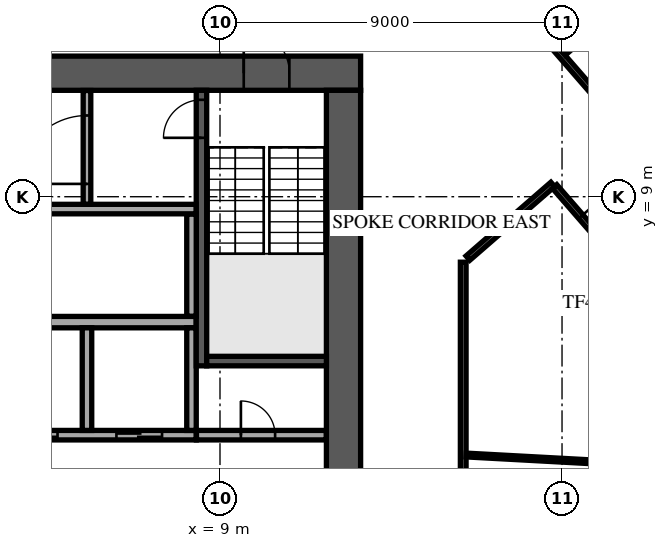
"""IFC4 building model, lengths in metres.
Left out: names, types, materials, properties, quantities, classifications, styles, units other than length and angle.
Written with IfcOpenShell. Run it as: python <this file> out.ifc"""

import sys

from ifc_helpers import new_model, si_unit, direction, frame, frame_2d, origin, place, context, subcontext, project, spatial, rectangle, extrude, element, fill, save


model = new_model("IFC4")
c1 = context("Model", 3, precision=1e-05, world=origin(), true_north=direction((0.0, 1.0)))
c2 = subcontext(c1, "Body", "Model", "MODEL_VIEW")
j1 = project(units=[si_unit("LENGTHUNIT", "METRE"), si_unit("PLANEANGLEUNIT", "RADIAN")], contexts=[c1])
p1 = place(None, origin())
s1 = spatial("IfcSite", under=j1, at=p1, CompositionType="ELEMENT")
p2 = place(p1, origin())
s2 = spatial("IfcBuilding", under=s1, at=p2, CompositionType="ELEMENT")
p3 = place(p2, frame((0.0, 0.0, 193.3)))
s3 = spatial("IfcBuildingStorey", under=s2, at=p3, CompositionType="ELEMENT", Elevation=193.3)
p4 = place(p3, frame((-12.7, 12.25, 0.0), z_axis=(0.0, 0.0, 1.0), x_axis=(1.0, 0.0, 0.0)))
e1 = element("IfcWall", 1, at=p4, inside=s3, PredefinedType="SHEAR", context=c2, shape_type="SweptSolid", body=[
    extrude(rectangle(XDim=25.4, YDim=0.9, at=frame_2d((12.7, 0.0))), origin(), (0.0, 0.0, 1.0), 3.62),
])
p5 = place(p4, frame((11.5, 0.0, 0.0)))
e2 = element("IfcOpeningElement", 2, at=p5, cuts=e1, PredefinedType="OPENING", context=c2, shape_type="SweptSolid", body=[
    extrude(rectangle(XDim=2.4, YDim=2.4, at=frame_2d((1.2, 1.2))), frame((0.0, 0.46, 0.0), z_axis=(0.0, -1.0, 0.0), x_axis=(1.0, 0.0, 0.0)), (0.0, 0.0, 1.0), 0.92),
])
p6 = place(p4, frame((22.325, 0.0, 0.0)))
e3 = element("IfcOpeningElement", 3, at=p6, cuts=e1, PredefinedType="OPENING", context=c2, shape_type="SweptSolid", body=[
    extrude(rectangle(XDim=1.2, YDim=2.1, at=frame_2d((0.6, 1.05))), frame((0.0, 0.46, 0.0), z_axis=(0.0, -1.0, 0.0), x_axis=(1.0, 0.0, 0.0)), (0.0, 0.0, 1.0), 0.92),
])
p7 = place(p4, frame((1.3, 0.0, 0.0)))
e4 = element("IfcOpeningElement", 4, at=p7, cuts=e1, PredefinedType="OPENING", context=c2, shape_type="SweptSolid", body=[
    extrude(rectangle(XDim=1.0, YDim=2.1, at=frame_2d((0.5, 1.05))), frame((0.0, 0.46, 0.0), z_axis=(0.0, -1.0, 0.0), x_axis=(1.0, 0.0, 0.0)), (0.0, 0.0, 1.0), 0.92),
])
p8 = place(p3, frame((12.25, -11.8, 0.0), z_axis=(0.0, 0.0, 1.0), x_axis=(0.0, 1.0, 0.0)))
e5 = element("IfcWall", 5, at=p8, inside=s3, PredefinedType="SHEAR", context=c2, shape_type="SweptSolid", body=[
    extrude(rectangle(XDim=23.6, YDim=0.9, at=frame_2d((11.8, 0.0))), origin(), (0.0, 0.0, 1.0), 3.62),
])
p9 = place(p8, frame((10.6, 0.0, 0.0)))
e6 = element("IfcOpeningElement", 6, at=p9, cuts=e5, PredefinedType="OPENING", context=c2, shape_type="SweptSolid", body=[
    extrude(rectangle(XDim=2.4, YDim=2.4, at=frame_2d((1.2, 1.2))), frame((0.0, 0.46, 0.0), z_axis=(0.0, -1.0, 0.0), x_axis=(1.0, 0.0, 0.0)), (0.0, 0.0, 1.0), 0.92),
])
p10 = place(p3, frame((-8.375, 5.7, 0.0), z_axis=(0.0, 0.0, 1.0), x_axis=(1.0, 0.0, 0.0)))
e7 = element("IfcWall", 7, at=p10, inside=s3, PredefinedType="SOLIDWALL", context=c2, shape_type="SweptSolid", body=[
    extrude(rectangle(XDim=16.75, YDim=0.3, at=frame_2d((8.375, 0.0))), origin(), (0.0, 0.0, 1.0), 3.62),
])
p11 = place(p3, frame((-8.375, 2.725, 0.0), z_axis=(0.0, 0.0, 1.0), x_axis=(1.0, 0.0, 0.0)))
e8 = element("IfcWall", 8, at=p11, inside=s3, PredefinedType="SOLIDWALL", context=c2, shape_type="SweptSolid", body=[
    extrude(rectangle(XDim=16.75, YDim=0.25, at=frame_2d((8.375, 0.0))), origin(), (0.0, 0.0, 1.0), 3.62),
])
p12 = place(p11, frame((0.9, 0.0, 0.0)))
e9 = element("IfcOpeningElement", 9, at=p12, cuts=e8, PredefinedType="OPENING", context=c2, shape_type="SweptSolid", body=[
    extrude(rectangle(XDim=1.2, YDim=2.1, at=frame_2d((0.6, 1.05))), frame((0.0, 0.135, 0.0), z_axis=(0.0, -1.0, 0.0), x_axis=(1.0, 0.0, 0.0)), (0.0, 0.0, 1.0), 0.27),
])
p13 = place(p11, frame((3.65, 0.0, 0.0)))
e10 = element("IfcOpeningElement", 10, at=p13, cuts=e8, PredefinedType="OPENING", context=c2, shape_type="SweptSolid", body=[
    extrude(rectangle(XDim=1.2, YDim=2.1, at=frame_2d((0.6, 1.05))), frame((0.0, 0.135, 0.0), z_axis=(0.0, -1.0, 0.0), x_axis=(1.0, 0.0, 0.0)), (0.0, 0.0, 1.0), 0.27),
])
p14 = place(p11, frame((6.4, 0.0, 0.0)))
e11 = element("IfcOpeningElement", 11, at=p14, cuts=e8, PredefinedType="OPENING", context=c2, shape_type="SweptSolid", body=[
    extrude(rectangle(XDim=1.2, YDim=2.1, at=frame_2d((0.6, 1.05))), frame((0.0, 0.135, 0.0), z_axis=(0.0, -1.0, 0.0), x_axis=(1.0, 0.0, 0.0)), (0.0, 0.0, 1.0), 0.27),
])
p15 = place(p11, frame((9.15, 0.0, 0.0)))
e12 = element("IfcOpeningElement", 12, at=p15, cuts=e8, PredefinedType="OPENING", context=c2, shape_type="SweptSolid", body=[
    extrude(rectangle(XDim=1.2, YDim=2.1, at=frame_2d((0.6, 1.05))), frame((0.0, 0.135, 0.0), z_axis=(0.0, -1.0, 0.0), x_axis=(1.0, 0.0, 0.0)), (0.0, 0.0, 1.0), 0.27),
])
p16 = place(p11, frame((11.9, 0.0, 0.0)))
e13 = element("IfcOpeningElement", 13, at=p16, cuts=e8, PredefinedType="OPENING", context=c2, shape_type="SweptSolid", body=[
    extrude(rectangle(XDim=1.2, YDim=2.1, at=frame_2d((0.6, 1.05))), frame((0.0, 0.135, 0.0), z_axis=(0.0, -1.0, 0.0), x_axis=(1.0, 0.0, 0.0)), (0.0, 0.0, 1.0), 0.27),
])
p17 = place(p11, frame((14.65, 0.0, 0.0)))
e14 = element("IfcOpeningElement", 14, at=p17, cuts=e8, PredefinedType="OPENING", context=c2, shape_type="SweptSolid", body=[
    extrude(rectangle(XDim=1.2, YDim=2.1, at=frame_2d((0.6, 1.05))), frame((0.0, 0.135, 0.0), z_axis=(0.0, -1.0, 0.0), x_axis=(1.0, 0.0, 0.0)), (0.0, 0.0, 1.0), 0.27),
])
for number, where, z_axis, x_axis in (
    (15, (5.5, 2.85, 0.0), (0.0, 0.0, 1.0), (0.0, 1.0, 0.0)),
    (16, (8.25, 2.85, 0.0), (0.0, 0.0, 1.0), (0.0, 1.0, 0.0)),
):
    element("IfcWall", number, at=place(p3, frame(where, z_axis=z_axis, x_axis=x_axis)), inside=s3, PredefinedType="SOLIDWALL", context=c2, shape_type="SweptSolid", body=[
        extrude(rectangle(XDim=2.7, YDim=0.25, at=frame_2d((1.35, 0.0))), origin(), (0.0, 0.0, 1.0), 3.62),
    ])
p18 = place(p3, frame((8.512, 4.55, 0.0), z_axis=(0.0, 0.0, 1.0), x_axis=(0.0, 1.0, 0.0)))
e17 = element("IfcWall", 17, at=p18, inside=s3, PredefinedType="SOLIDWALL", context=c2, shape_type="SweptSolid", body=[
    extrude(rectangle(XDim=7.25, YDim=0.275, at=frame_2d((3.625, 0.0))), origin(), (0.0, 0.0, 1.0), 3.62),
])
p19 = place(p18, frame((6.0, 0.0, 0.0)))
e18 = element("IfcOpeningElement", 18, at=p19, cuts=e17, PredefinedType="OPENING", context=c2, shape_type="SweptSolid", body=[
    extrude(rectangle(XDim=1.0, YDim=2.1, at=frame_2d((0.5, 1.05))), frame((0.0, 0.147, 0.0), z_axis=(0.0, -1.0, 0.0), x_axis=(1.0, 0.0, 0.0)), (0.0, 0.0, 1.0), 0.295),
])
p20 = place(p3, frame((8.65, 4.675, 0.0), z_axis=(0.0, 0.0, 1.0), x_axis=(1.0, 0.0, 0.0)))
e19 = element("IfcWall", 19, at=p20, inside=s3, PredefinedType="SOLIDWALL", context=c2, shape_type="SweptSolid", body=[
    extrude(rectangle(XDim=3.15, YDim=0.25, at=frame_2d((1.575, 0.0))), origin(), (0.0, 0.0, 1.0), 3.62),
])
p21 = place(p3, frame((8.38, 2.725, 0.0), z_axis=(0.0, 0.0, 1.0), x_axis=(1.0, 0.0, 0.0)))
e20 = element("IfcWall", 20, at=p21, inside=s3, PredefinedType="PARTITIONING", context=c2, shape_type="SweptSolid", body=[
    extrude(rectangle(XDim=3.415, YDim=0.25, at=frame_2d((1.708, 0.0))), origin(), (0.0, 0.0, 1.0), 3.62),
])
p22 = place(p21, frame((1.17, 0.0, 0.0)))
e21 = element("IfcOpeningElement", 21, at=p22, cuts=e20, PredefinedType="OPENING", context=c2, shape_type="SweptSolid", body=[
    extrude(rectangle(XDim=0.9, YDim=2.1, at=frame_2d((0.45, 1.05))), frame((0.0, 0.135, 0.0), z_axis=(0.0, -1.0, 0.0), x_axis=(1.0, 0.0, 0.0)), (0.0, 0.0, 1.0), 0.27),
])
p23 = place(p3, frame((8.25, 5.855, 0.0), z_axis=(0.0, 0.0, 1.0), x_axis=(0.0, 1.0, 0.0)))
e22 = element("IfcWall", 22, at=p23, inside=s3, PredefinedType="PARTITIONING", context=c2, shape_type="SweptSolid", body=[
    extrude(rectangle(XDim=2.69, YDim=0.25, at=frame_2d((1.345, 0.0))), origin(), (0.0, 0.0, 1.0), 3.62),
])
p24 = place(p3, frame((-8.35, 8.675, 0.0), z_axis=(0.0, 0.0, 1.0), x_axis=(1.0, 0.0, 0.0)))
e23 = element("IfcWall", 23, at=p24, inside=s3, PredefinedType="PARTITIONING", context=c2, shape_type="SweptSolid", body=[
    extrude(rectangle(XDim=16.72, YDim=0.25, at=frame_2d((8.36, 0.0))), origin(), (0.0, 0.0, 1.0), 3.62),
])
p25 = place(p24, frame((0.975, 0.0, 0.0)))
e24 = element("IfcOpeningElement", 24, at=p25, cuts=e23, PredefinedType="OPENING", context=c2, shape_type="SweptSolid", body=[
    extrude(rectangle(XDim=1.0, YDim=2.1, at=frame_2d((0.5, 1.05))), frame((0.0, 0.135, 0.0), z_axis=(0.0, -1.0, 0.0), x_axis=(1.0, 0.0, 0.0)), (0.0, 0.0, 1.0), 0.27),
])
p26 = place(p24, frame((6.375, 0.0, 0.0)))
e25 = element("IfcOpeningElement", 25, at=p26, cuts=e23, PredefinedType="OPENING", context=c2, shape_type="SweptSolid", body=[
    extrude(rectangle(XDim=1.2, YDim=2.1, at=frame_2d((0.6, 1.05))), frame((0.0, 0.135, 0.0), z_axis=(0.0, -1.0, 0.0), x_axis=(1.0, 0.0, 0.0)), (0.0, 0.0, 1.0), 0.27),
])
p27 = place(p3, frame((5.5, 8.805, 0.0), z_axis=(0.0, 0.0, 1.0), x_axis=(0.0, 1.0, 0.0)))
e26 = element("IfcWall", 26, at=p27, inside=s3, PredefinedType="PARTITIONING", context=c2, shape_type="SweptSolid", body=[
    extrude(rectangle(XDim=2.99, YDim=0.2, at=frame_2d((1.495, 0.0))), origin(), (0.0, 0.0, 1.0), 3.62),
])
p28 = place(p27, frame((0.532, 0.0, 0.0)))
e27 = element("IfcOpeningElement", 27, at=p28, cuts=e26, PredefinedType="OPENING", context=c2, shape_type="SweptSolid", body=[
    extrude(rectangle(XDim=1.8, YDim=2.1, at=frame_2d((0.9, 1.05))), frame((0.0, 0.11, 0.0), z_axis=(0.0, -1.0, 0.0), x_axis=(1.0, 0.0, 0.0)), (0.0, 0.0, 1.0), 0.22),
])
p29 = place(p3, frame((35.208, 4.768, 0.0), z_axis=(0.0, 0.0, 1.0), x_axis=(-0.656058749455, 0.754709823219, 0.0)))
e28 = element("IfcWall", 28, at=p29, inside=s3, PredefinedType="STANDARD", context=c2, shape_type="SweptSolid", body=[
    extrude(rectangle(XDim=39.0, YDim=0.6, at=frame_2d((19.5, 0.0))), origin(), (0.0, 0.0, 1.0), 3.62),
])
p30 = place(p29, frame((1.217, 0.0, 0.9)))
e29 = element("IfcOpeningElement", 29, at=p30, cuts=e28, PredefinedType="OPENING", context=c2, shape_type="SweptSolid", body=[
    extrude(rectangle(XDim=1.9, YDim=2.1, at=frame_2d((0.95, 1.05))), frame((0.0, 0.31, 0.0), z_axis=(0.0, -1.0, 0.0), x_axis=(1.0, 0.0, 0.0)), (0.0, 0.0, 1.0), 0.62),
])
p31 = place(p29, frame((5.55, 0.0, 0.9)))
e30 = element("IfcOpeningElement", 30, at=p31, cuts=e28, PredefinedType="OPENING", context=c2, shape_type="SweptSolid", body=[
    extrude(rectangle(XDim=1.9, YDim=2.1, at=frame_2d((0.95, 1.05))), frame((0.0, 0.31, 0.0), z_axis=(0.0, -1.0, 0.0), x_axis=(1.0, 0.0, 0.0)), (0.0, 0.0, 1.0), 0.62),
])
p32 = place(p29, frame((9.883, 0.0, 0.9)))
e31 = element("IfcOpeningElement", 31, at=p32, cuts=e28, PredefinedType="OPENING", context=c2, shape_type="SweptSolid", body=[
    extrude(rectangle(XDim=1.9, YDim=2.1, at=frame_2d((0.95, 1.05))), frame((0.0, 0.31, 0.0), z_axis=(0.0, -1.0, 0.0), x_axis=(1.0, 0.0, 0.0)), (0.0, 0.0, 1.0), 0.62),
])
p33 = place(p29, frame((14.217, 0.0, 0.9)))
e32 = element("IfcOpeningElement", 32, at=p33, cuts=e28, PredefinedType="OPENING", context=c2, shape_type="SweptSolid", body=[
    extrude(rectangle(XDim=1.9, YDim=2.1, at=frame_2d((0.95, 1.05))), frame((0.0, 0.31, 0.0), z_axis=(0.0, -1.0, 0.0), x_axis=(1.0, 0.0, 0.0)), (0.0, 0.0, 1.0), 0.62),
])
p34 = place(p29, frame((18.55, 0.0, 0.9)))
e33 = element("IfcOpeningElement", 33, at=p34, cuts=e28, PredefinedType="OPENING", context=c2, shape_type="SweptSolid", body=[
    extrude(rectangle(XDim=1.9, YDim=2.1, at=frame_2d((0.95, 1.05))), frame((0.0, 0.31, 0.0), z_axis=(0.0, -1.0, 0.0), x_axis=(1.0, 0.0, 0.0)), (0.0, 0.0, 1.0), 0.62),
])
p35 = place(p29, frame((22.883, 0.0, 0.9)))
e34 = element("IfcOpeningElement", 34, at=p35, cuts=e28, PredefinedType="OPENING", context=c2, shape_type="SweptSolid", body=[
    extrude(rectangle(XDim=1.9, YDim=2.1, at=frame_2d((0.95, 1.05))), frame((0.0, 0.31, 0.0), z_axis=(0.0, -1.0, 0.0), x_axis=(1.0, 0.0, 0.0)), (0.0, 0.0, 1.0), 0.62),
])
p36 = place(p29, frame((27.217, 0.0, 0.9)))
e35 = element("IfcOpeningElement", 35, at=p36, cuts=e28, PredefinedType="OPENING", context=c2, shape_type="SweptSolid", body=[
    extrude(rectangle(XDim=1.9, YDim=2.1, at=frame_2d((0.95, 1.05))), frame((0.0, 0.31, 0.0), z_axis=(0.0, -1.0, 0.0), x_axis=(1.0, 0.0, 0.0)), (0.0, 0.0, 1.0), 0.62),
])
p37 = place(p29, frame((31.55, 0.0, 0.9)))
e36 = element("IfcOpeningElement", 36, at=p37, cuts=e28, PredefinedType="OPENING", context=c2, shape_type="SweptSolid", body=[
    extrude(rectangle(XDim=1.9, YDim=2.1, at=frame_2d((0.95, 1.05))), frame((0.0, 0.31, 0.0), z_axis=(0.0, -1.0, 0.0), x_axis=(1.0, 0.0, 0.0)), (0.0, 0.0, 1.0), 0.62),
])
p38 = place(p29, frame((35.883, 0.0, 0.9)))
e37 = element("IfcOpeningElement", 37, at=p38, cuts=e28, PredefinedType="OPENING", context=c2, shape_type="SweptSolid", body=[
    extrude(rectangle(XDim=1.9, YDim=2.1, at=frame_2d((0.95, 1.05))), frame((0.0, 0.31, 0.0), z_axis=(0.0, -1.0, 0.0), x_axis=(1.0, 0.0, 0.0)), (0.0, 0.0, 1.0), 0.62),
])
p39 = place(p3, frame((8.103, 24.087, 0.0), z_axis=(0.0, 0.0, 1.0), x_axis=(0.656048444225, -0.754718781289, 0.0)))
e38 = element("IfcWall", 38, at=p39, inside=s3, PredefinedType="PARTITIONING", context=c2, shape_type="SweptSolid", body=[
    extrude(rectangle(XDim=25.8, YDim=0.15, at=frame_2d((12.9, 0.0))), origin(), (0.0, 0.0, 1.0), 3.17),
])
p40 = place(p3, frame((15.4, -8.667, 0.0), z_axis=(0.0, 0.0, 1.0), x_axis=(0.0, 1.0, 0.0)))
e39 = element("IfcWall", 39, at=p40, inside=s3, PredefinedType="PARTITIONING", context=c2, shape_type="SweptSolid", body=[
    extrude(rectangle(XDim=15.944, YDim=0.15, at=frame_2d((7.972, 0.0))), origin(), (0.0, 0.0, 1.0), 3.17),
])
p41 = place(p3, frame((15.524, 7.385, 0.0), z_axis=(0.0, 0.0, 1.0), x_axis=(0.754751247574, 0.656011093111, 0.0)))
e40 = element("IfcWall", 40, at=p41, inside=s3, PredefinedType="PARTITIONING", context=c2, shape_type="SweptSolid", body=[
    extrude(rectangle(XDim=2.957, YDim=0.15, at=frame_2d((1.479, 0.0))), origin(), (0.0, 0.0, 1.0), 3.17),
])
p42 = place(p3, frame((17.805, 9.268, 0.0), z_axis=(0.0, 0.0, 1.0), x_axis=(0.656027059873, -0.754737369364, 0.0)))
e41 = element("IfcWall", 41, at=p42, inside=s3, PredefinedType="PARTITIONING", context=c2, shape_type="SweptSolid", body=[
    extrude(rectangle(XDim=8.251, YDim=0.15, at=frame_2d((4.125, 0.0))), origin(), (0.0, 0.0, 1.0), 3.17),
])
p43 = place(p42, frame((1.05, 0.0, 0.0)))
e42 = element("IfcOpeningElement", 42, at=p43, cuts=e41, PredefinedType="OPENING", context=c2, shape_type="SweptSolid", body=[
    extrude(rectangle(XDim=1.8, YDim=2.1, at=frame_2d((0.9, 1.05))), frame((0.0, 0.085, 0.0), z_axis=(0.0, -1.0, 0.0), x_axis=(1.0, 0.0, 0.0)), (0.0, 0.0, 1.0), 0.17),
])
p44 = place(p42, frame((6.05, 0.0, 0.0)))
e43 = element("IfcOpeningElement", 43, at=p44, cuts=e41, PredefinedType="OPENING", context=c2, shape_type="SweptSolid", body=[
    extrude(rectangle(XDim=1.0, YDim=2.1, at=frame_2d((0.5, 1.05))), frame((0.0, 0.085, 0.0), z_axis=(0.0, -1.0, 0.0), x_axis=(1.0, 0.0, 0.0)), (0.0, 0.0, 1.0), 0.17),
])
p45 = place(p3, frame((15.478, 2.203, 0.0), z_axis=(0.0, 0.0, 1.0), x_axis=(0.998532575908, -0.054154361321, 0.0)))
e44 = element("IfcWall", 44, at=p45, inside=s3, PredefinedType="PARTITIONING", context=c2, shape_type="SweptSolid", body=[
    extrude(rectangle(XDim=15.869, YDim=0.1, at=frame_2d((7.935, 0.0))), origin(), (0.0, 0.0, 1.0), 3.62),
])
p46 = place(p3, frame((18.05, 12.76, 0.0), z_axis=(0.0, 0.0, 1.0), x_axis=(0.751001885152, 0.660300059441, 0.0)))
e45 = element("IfcWall", 45, at=p46, inside=s3, PredefinedType="PARTITIONING", context=c2, shape_type="SweptSolid", body=[
    extrude(rectangle(XDim=7.405, YDim=0.1, at=frame_2d((3.702, 0.0))), origin(), (0.0, 0.0, 1.0), 3.17),
])
p47 = place(p6, origin())
e46 = element("IfcDoor", 46, at=p47, inside=s3, OperationType="SINGLE_SWING_LEFT", PredefinedType="DOOR", context=c2, shape_type="SweptSolid", body=[
    extrude(rectangle(XDim=1.2, YDim=2.1, at=frame_2d((0.6, 1.05))), frame((0.0, 0.025, 0.0), z_axis=(0.0, -1.0, 0.0), x_axis=(1.0, 0.0, 0.0)), (0.0, 0.0, 1.0), 0.05),
])
fill(e3, e46)
p48 = place(p16, origin())
e47 = element("IfcDoor", 47, at=p48, inside=s3, OperationType="DOUBLE_DOOR_SLIDING", PredefinedType="DOOR", context=c2, shape_type="SweptSolid", body=[
    extrude(rectangle(XDim=1.2, YDim=2.1, at=frame_2d((0.6, 1.05))), frame((0.0, 0.025, 0.0), z_axis=(0.0, -1.0, 0.0), x_axis=(1.0, 0.0, 0.0)), (0.0, 0.0, 1.0), 0.05),
])
fill(e13, e47)
p49 = place(p17, origin())
e48 = element("IfcDoor", 48, at=p49, inside=s3, OperationType="DOUBLE_DOOR_SLIDING", PredefinedType="DOOR", context=c2, shape_type="SweptSolid", body=[
    extrude(rectangle(XDim=1.2, YDim=2.1, at=frame_2d((0.6, 1.05))), frame((0.0, 0.025, 0.0), z_axis=(0.0, -1.0, 0.0), x_axis=(1.0, 0.0, 0.0)), (0.0, 0.0, 1.0), 0.05),
])
fill(e14, e48)
p50 = place(p19, origin())
e49 = element("IfcDoor", 49, at=p50, inside=s3, OperationType="SINGLE_SWING_LEFT", PredefinedType="DOOR", context=c2, shape_type="SweptSolid", body=[
    extrude(rectangle(XDim=1.0, YDim=2.1, at=frame_2d((0.5, 1.05))), frame((0.0, 0.025, 0.0), z_axis=(0.0, -1.0, 0.0), x_axis=(1.0, 0.0, 0.0)), (0.0, 0.0, 1.0), 0.05),
])
fill(e18, e49)
p51 = place(p22, origin())
e50 = element("IfcDoor", 50, at=p51, inside=s3, OperationType="SINGLE_SWING_RIGHT", PredefinedType="DOOR", context=c2, shape_type="SweptSolid", body=[
    extrude(rectangle(XDim=0.9, YDim=2.1, at=frame_2d((0.45, 1.05))), frame((0.0, 0.025, 0.0), z_axis=(0.0, -1.0, 0.0), x_axis=(1.0, 0.0, 0.0)), (0.0, 0.0, 1.0), 0.05),
])
fill(e21, e50)
p52 = place(p28, origin())
e51 = element("IfcDoor", 51, at=p52, inside=s3, OperationType="SINGLE_SWING_LEFT", PredefinedType="DOOR", context=c2, shape_type="SweptSolid", body=[
    extrude(rectangle(XDim=1.8, YDim=2.1, at=frame_2d((0.9, 1.05))), frame((0.0, 0.025, 0.0), z_axis=(0.0, -1.0, 0.0), x_axis=(1.0, 0.0, 0.0)), (0.0, 0.0, 1.0), 0.05),
])
fill(e27, e51)
p53 = place(p43, frame((1.8, 0.0, 0.0), z_axis=(0.0, 0.0, 1.0), x_axis=(-1.0, 0.0, 0.0)))
e52 = element("IfcDoor", 52, at=p53, inside=s3, OperationType="DOUBLE_DOOR_SINGLE_SWING", PredefinedType="DOOR", context=c2, shape_type="SweptSolid", body=[
    extrude(rectangle(XDim=1.8, YDim=2.1, at=frame_2d((0.9, 1.05))), frame((0.0, 0.025, 0.0), z_axis=(0.0, -1.0, 0.0), x_axis=(1.0, 0.0, 0.0)), (0.0, 0.0, 1.0), 0.05),
])
fill(e42, e52)
save(model, sys.argv[1])
